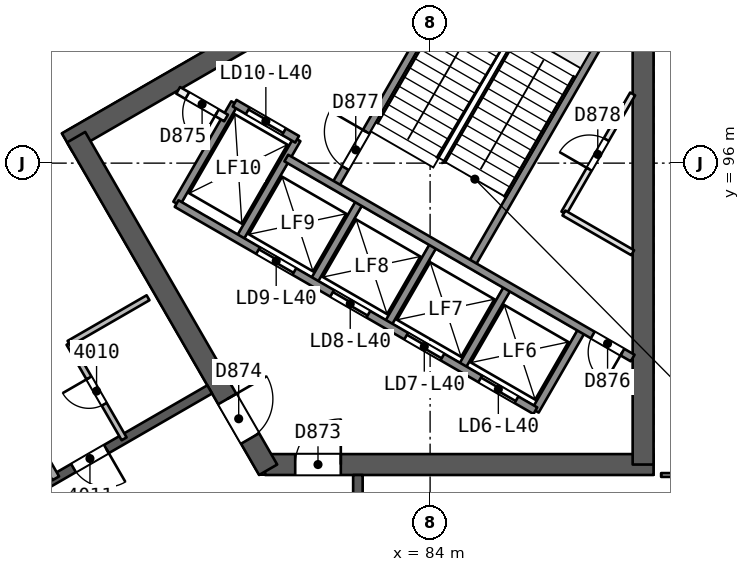
"""IFC4 building model, lengths in metres.
Left out: names, types, materials, properties, quantities, classifications, styles, units other than length and angle.
Written with IfcOpenShell. Run it as: python <this file> out.ifc"""

import sys

from ifc_helpers import new_model, si_unit, direction, frame, frame_2d, origin, place, context, subcontext, project, spatial, rectangle, extrude, element, fill, save


model = new_model("IFC4")
c1 = context("Model", 3, precision=1e-05, world=origin(), true_north=direction((0.0, 1.0)))
c2 = subcontext(c1, "Body", "Model", "MODEL_VIEW")
j1 = project(units=[si_unit("LENGTHUNIT", "METRE"), si_unit("PLANEANGLEUNIT", "RADIAN")], contexts=[c1])
p1 = place(None, origin())
s1 = spatial("IfcSite", under=j1, at=p1, CompositionType="ELEMENT")
p2 = place(p1, origin())
s2 = spatial("IfcBuilding", under=s1, at=p2, CompositionType="ELEMENT")
p3 = place(p2, frame((0.0, 0.0, 167.4)))
s3 = spatial("IfcBuildingStorey", under=s2, at=p3, CompositionType="ELEMENT", Elevation=167.4)
p4 = place(p3, frame((79.659, 88.069, 0.0), z_axis=(0.0, 0.0, 1.0), x_axis=(1.0, 0.0, 0.0)))
e1 = element("IfcWall", 1, at=p4, inside=s3, PredefinedType="SHEAR", context=c2, shape_type="SweptSolid", body=[
    extrude(rectangle(XDim=10.221, YDim=0.55, at=frame_2d((5.111, 0.0))), origin(), (0.0, 0.0, 1.0), 3.7),
])
p5 = place(p4, frame((0.791, 0.0, 0.0)))
e2 = element("IfcOpeningElement", 2, at=p5, cuts=e1, PredefinedType="OPENING", context=c2, shape_type="SweptSolid", body=[
    extrude(rectangle(XDim=1.2, YDim=2.1, at=frame_2d((0.6, 1.05))), frame((0.0, 0.286, 0.0), z_axis=(0.0, -1.0, 0.0), x_axis=(1.0, 0.0, 0.0)), (0.0, 0.0, 1.0), 0.571),
])
p6 = place(p3, frame((89.605, 88.069, 0.0), z_axis=(0.0, 0.0, 1.0), x_axis=(0.0, 1.0, 0.0)))
e3 = element("IfcWall", 3, at=p6, inside=s3, PredefinedType="SHEAR", context=c2, shape_type="SweptSolid", body=[
    extrude(rectangle(XDim=14.058, YDim=0.55, at=frame_2d((7.029, 0.0))), origin(), (0.0, 0.0, 1.0), 3.7),
])
p7 = place(p3, frame((86.723, 103.633, 0.0), z_axis=(0.0, 0.0, 1.0), x_axis=(-0.866023530946, -0.500003243837, 0.0)))
e4 = element("IfcWall", 4, at=p7, inside=s3, PredefinedType="SHEAR", context=c2, shape_type="SweptSolid", body=[
    extrude(rectangle(XDim=14.175, YDim=0.55, at=frame_2d((7.087, 0.0))), origin(), (0.0, 0.0, 1.0), 3.7),
])
p8 = place(p3, frame((74.686, 96.683, 0.0), z_axis=(0.0, 0.0, 1.0), x_axis=(0.499997818338, -0.866026663364, 0.0)))
e5 = element("IfcWall", 5, at=p8, inside=s3, PredefinedType="SHEAR", context=c2, shape_type="SweptSolid", body=[
    extrude(rectangle(XDim=10.105, YDim=0.55, at=frame_2d((5.052, 0.0))), origin(), (0.0, 0.0, 1.0), 3.7),
])
p9 = place(p8, frame((7.955, 0.0, 0.0)))
e6 = element("IfcOpeningElement", 6, at=p9, cuts=e5, PredefinedType="OPENING", context=c2, shape_type="SweptSolid", body=[
    extrude(rectangle(XDim=1.2, YDim=2.1, at=frame_2d((0.6, 1.05))), frame((0.0, 0.286, 0.0), z_axis=(0.0, -1.0, 0.0), x_axis=(1.0, 0.0, 0.0)), (0.0, 0.0, 1.0), 0.571),
])
p10 = place(p3, frame((82.1, 72.206, 0.0), z_axis=(0.0, 0.0, 1.0), x_axis=(0.0, 1.0, 0.0)))
e7 = element("IfcWall", 7, at=p10, inside=s3, PredefinedType="SHEAR", context=c2, shape_type="SweptSolid", body=[
    extrude(rectangle(XDim=15.588, YDim=0.25, at=frame_2d((7.794, 0.0))), origin(), (0.0, 0.0, 1.0), 3.25),
])
p11 = place(p10, frame((2.618, 0.0, 0.0)))
e8 = element("IfcOpeningElement", 8, at=p11, cuts=e7, PredefinedType="OPENING", context=c2, shape_type="SweptSolid", body=[
    extrude(rectangle(XDim=1.0, YDim=2.1, at=frame_2d((0.5, 1.05))), frame((0.0, 0.135, 0.0), z_axis=(0.0, -1.0, 0.0), x_axis=(1.0, 0.0, 0.0)), (0.0, 0.0, 1.0), 0.271),
])
p12 = place(p10, frame((8.285, 0.0, 0.0)))
e9 = element("IfcOpeningElement", 9, at=p12, cuts=e7, PredefinedType="OPENING", context=c2, shape_type="SweptSolid", body=[
    extrude(rectangle(XDim=1.2, YDim=2.4, at=frame_2d((0.6, 1.2))), frame((0.0, 0.135, 0.0), z_axis=(0.0, -1.0, 0.0), x_axis=(1.0, 0.0, 0.0)), (0.0, 0.0, 1.0), 0.271),
])
p13 = place(p10, frame((13.062, 0.0, 0.0)))
e10 = element("IfcOpeningElement", 10, at=p13, cuts=e7, PredefinedType="OPENING", context=c2, shape_type="SweptSolid", body=[
    extrude(rectangle(XDim=1.0, YDim=2.1, at=frame_2d((0.5, 1.05))), frame((0.0, 0.135, 0.0), z_axis=(0.0, -1.0, 0.0), x_axis=(1.0, 0.0, 0.0)), (0.0, 0.0, 1.0), 0.271),
])
p14 = place(p3, frame((78.2, 90.046, 0.0), z_axis=(0.0, 0.0, 1.0), x_axis=(-0.866026492143, -0.499998114903, 0.0)))
e11 = element("IfcWall", 11, at=p14, inside=s3, PredefinedType="SHEAR", context=c2, shape_type="SweptSolid", body=[
    extrude(rectangle(XDim=15.588, YDim=0.25, at=frame_2d((7.794, 0.0))), origin(), (0.0, 0.0, 1.0), 3.25),
])
p15 = place(p14, frame((3.138, 0.0, 0.0)))
e12 = element("IfcOpeningElement", 12, at=p15, cuts=e11, PredefinedType="OPENING", context=c2, shape_type="SweptSolid", body=[
    extrude(rectangle(XDim=1.0, YDim=2.1, at=frame_2d((0.5, 1.05))), frame((0.0, 0.135, 0.0), z_axis=(0.0, -1.0, 0.0), x_axis=(1.0, 0.0, 0.0)), (0.0, 0.0, 1.0), 0.271),
])
p16 = place(p14, frame((5.629, 0.0, 0.0)))
e13 = element("IfcOpeningElement", 13, at=p16, cuts=e11, PredefinedType="OPENING", context=c2, shape_type="SweptSolid", body=[
    extrude(rectangle(XDim=0.9, YDim=2.1, at=frame_2d((0.45, 1.05))), frame((0.0, 0.135, 0.0), z_axis=(0.0, -1.0, 0.0), x_axis=(1.0, 0.0, 0.0)), (0.0, 0.0, 1.0), 0.271),
])
p17 = place(p14, frame((8.435, 0.0, 0.0)))
e14 = element("IfcOpeningElement", 14, at=p17, cuts=e11, PredefinedType="OPENING", context=c2, shape_type="SweptSolid", body=[
    extrude(rectangle(XDim=0.9, YDim=2.1, at=frame_2d((0.45, 1.05))), frame((0.0, 0.135, 0.0), z_axis=(0.0, -1.0, 0.0), x_axis=(1.0, 0.0, 0.0)), (0.0, 0.0, 1.0), 0.271),
])
p18 = place(p14, frame((12.438, 0.0, 0.0)))
e15 = element("IfcOpeningElement", 15, at=p18, cuts=e11, PredefinedType="OPENING", context=c2, shape_type="SweptSolid", body=[
    extrude(rectangle(XDim=1.0, YDim=2.1, at=frame_2d((0.5, 1.05))), frame((0.0, 0.135, 0.0), z_axis=(0.0, -1.0, 0.0), x_axis=(1.0, 0.0, 0.0)), (0.0, 0.0, 1.0), 0.271),
])
p19 = place(p3, frame((93.577, 87.794, 0.0), z_axis=(0.0, 0.0, 1.0), x_axis=(-1.0, 0.0, 0.0)))
e16 = element("IfcWall", 16, at=p19, inside=s3, PredefinedType="PARTITIONING", context=c2, shape_type="SweptSolid", body=[
    extrude(rectangle(XDim=3.498, YDim=0.1, at=frame_2d((1.749, 0.0))), origin(), (0.0, 0.0, 1.0), 3.25),
])
p20 = place(p19, frame((1.299, 0.0, 0.0)))
e17 = element("IfcOpeningElement", 17, at=p20, cuts=e16, PredefinedType="OPENING", context=c2, shape_type="SweptSolid", body=[
    extrude(rectangle(XDim=0.9, YDim=2.1, at=frame_2d((0.45, 1.05))), frame((0.0, 0.061, 0.0), z_axis=(0.0, -1.0, 0.0), x_axis=(1.0, 0.0, 0.0)), (0.0, 0.0, 1.0), 0.121),
])
p21 = place(p3, frame((75.948, 88.746, 0.0), z_axis=(0.0, 0.0, 1.0), x_axis=(-0.499987231761, 0.866032775405, 0.0)))
e18 = element("IfcWall", 18, at=p21, inside=s3, PredefinedType="PARTITIONING", context=c2, shape_type="SweptSolid", body=[
    extrude(rectangle(XDim=2.9, YDim=0.15, at=frame_2d((1.45, 0.0))), origin(), (0.0, 0.0, 1.0), 3.25),
])
p22 = place(p21, frame((1.05, 0.0, 0.0)))
e19 = element("IfcOpeningElement", 19, at=p22, cuts=e18, PredefinedType="OPENING", context=c2, shape_type="SweptSolid", body=[
    extrude(rectangle(XDim=0.8, YDim=2.1, at=frame_2d((0.4, 1.05))), frame((0.0, 0.085, 0.0), z_axis=(0.0, -1.0, 0.0), x_axis=(1.0, 0.0, 0.0)), (0.0, 0.0, 1.0), 0.171),
])
p23 = place(p3, frame((74.498, 91.257, 0.0), z_axis=(0.0, 0.0, 1.0), x_axis=(0.866038271014, 0.499977712642, 0.0)))
e20 = element("IfcWall", 20, at=p23, inside=s3, PredefinedType="PARTITIONING", context=c2, shape_type="SweptSolid", body=[
    extrude(rectangle(XDim=2.401, YDim=0.15, at=frame_2d((1.2, 0.0))), origin(), (0.0, 0.0, 1.0), 3.25),
])
p24 = place(p3, frame((68.411, 97.647, 0.0), z_axis=(0.0, 0.0, 1.0), x_axis=(0.499998657322, -0.866026178979, 0.0)))
e21 = element("IfcWall", 21, at=p24, inside=s3, PredefinedType="PARTITIONING", context=c2, shape_type="SweptSolid", body=[
    extrude(rectangle(XDim=11.477, YDim=0.2, at=frame_2d((5.739, 0.0))), origin(), (0.0, 0.0, 1.0), 3.25),
])
p25 = place(p3, frame((42.319, 82.755, 0.0), z_axis=(0.0, 0.0, 1.0), x_axis=(0.866024017239, 0.50000240156, 0.0)))
e22 = element("IfcWall", 22, at=p25, inside=s3, PredefinedType="SOLIDWALL", context=c2, shape_type="SweptSolid", body=[
    extrude(rectangle(XDim=53.85, YDim=0.3, at=frame_2d((26.925, 0.0))), origin(), (0.0, 0.0, 1.0), 3.25),
])
p26 = place(p25, frame((20.581, 0.0, 0.0)))
e23 = element("IfcOpeningElement", 23, at=p26, cuts=e22, PredefinedType="OPENING", context=c2, shape_type="SweptSolid", body=[
    extrude(rectangle(XDim=2.4, YDim=2.4, at=frame_2d((1.2, 1.2))), frame((0.0, 0.161, 0.0), z_axis=(0.0, -1.0, 0.0), x_axis=(1.0, 0.0, 0.0)), (0.0, 0.0, 1.0), 0.321),
])
p27 = place(p25, frame((9.622, 0.0, 0.0)))
e24 = element("IfcOpeningElement", 24, at=p27, cuts=e22, PredefinedType="OPENING", context=c2, shape_type="SweptSolid", body=[
    extrude(rectangle(XDim=2.4, YDim=2.4, at=frame_2d((1.2, 1.2))), frame((0.0, 0.161, 0.0), z_axis=(0.0, -1.0, 0.0), x_axis=(1.0, 0.0, 0.0)), (0.0, 0.0, 1.0), 0.321),
])
p28 = place(p25, frame((40.79, 0.0, 0.0)))
e25 = element("IfcOpeningElement", 25, at=p28, cuts=e22, PredefinedType="OPENING", context=c2, shape_type="SweptSolid", body=[
    extrude(rectangle(XDim=2.4, YDim=2.4, at=frame_2d((1.2, 1.2))), frame((0.0, 0.161, 0.0), z_axis=(0.0, -1.0, 0.0), x_axis=(1.0, 0.0, 0.0)), (0.0, 0.0, 1.0), 0.321),
])
p29 = place(p25, frame((27.74, 0.0, 0.9)))
e26 = element("IfcOpeningElement", 26, at=p29, cuts=e22, PredefinedType="OPENING", context=c2, shape_type="SweptSolid", body=[
    extrude(rectangle(XDim=1.8, YDim=1.5, at=frame_2d((0.9, 0.75))), frame((0.0, 0.161, 0.0), z_axis=(0.0, -1.0, 0.0), x_axis=(1.0, 0.0, 0.0)), (0.0, 0.0, 1.0), 0.321),
])
p30 = place(p25, frame((24.934, 0.0, 0.9)))
e27 = element("IfcOpeningElement", 27, at=p30, cuts=e22, PredefinedType="OPENING", context=c2, shape_type="SweptSolid", body=[
    extrude(rectangle(XDim=1.8, YDim=1.5, at=frame_2d((0.9, 0.75))), frame((0.0, 0.161, 0.0), z_axis=(0.0, -1.0, 0.0), x_axis=(1.0, 0.0, 0.0)), (0.0, 0.0, 1.0), 0.321),
])
p31 = place(p3, frame((86.77, 89.486, 0.0), z_axis=(0.0, 0.0, 1.0), x_axis=(0.499961042966, 0.86604789447, 0.0)))
e28 = element("IfcWall", 28, at=p31, inside=s3, PredefinedType="SOLIDWALL", context=c2, shape_type="SweptSolid", body=[
    extrude(rectangle(XDim=2.48, YDim=0.2, at=frame_2d((1.24, 0.0))), origin(), (0.0, 0.0, 1.0), 3.25),
])
p32 = place(p3, frame((87.521, 94.687, 0.0), z_axis=(0.0, 0.0, 1.0), x_axis=(0.500043727655, 0.866000156139, 0.0)))
e29 = element("IfcWall", 29, at=p32, inside=s3, PredefinedType="PARTITIONING", context=c2, shape_type="SweptSolid", body=[
    extrude(rectangle(XDim=3.618, YDim=0.15, at=frame_2d((1.809, 0.0))), origin(), (0.0, 0.0, 1.0), 3.25),
])
p33 = place(p32, frame((1.332, 0.0, 0.0)))
e30 = element("IfcOpeningElement", 30, at=p33, cuts=e29, PredefinedType="OPENING", context=c2, shape_type="SweptSolid", body=[
    extrude(rectangle(XDim=0.9, YDim=2.1, at=frame_2d((0.45, 1.05))), frame((0.0, 0.085, 0.0), z_axis=(0.0, -1.0, 0.0), x_axis=(1.0, 0.0, 0.0)), (0.0, 0.0, 1.0), 0.171),
])
p34 = place(p3, frame((84.821, 90.611, 0.0), z_axis=(0.0, 0.0, 1.0), x_axis=(0.499961042966, 0.86604789447, 0.0)))
e31 = element("IfcWall", 31, at=p34, inside=s3, PredefinedType="SOLIDWALL", context=c2, shape_type="SweptSolid", body=[
    extrude(rectangle(XDim=2.48, YDim=0.2, at=frame_2d((1.24, 0.0))), origin(), (0.0, 0.0, 1.0), 3.25),
])
p35 = place(p3, frame((85.087, 93.321, 0.0), z_axis=(0.0, 0.0, 1.0), x_axis=(0.500019787375, 0.866013979237, 0.0)))
e32 = element("IfcWall", 32, at=p35, inside=s3, PredefinedType="SOLIDWALL", context=c2, shape_type="SweptSolid", body=[
    extrude(rectangle(XDim=7.7, YDim=0.2, at=frame_2d((3.85, 0.0))), origin(), (0.0, 0.0, 1.0), 3.25),
])
for number, where, z_axis, x_axis in (
    (33, (82.873, 91.736, 0.0), (0.0, 0.0, 1.0), (0.5, 0.866, 0.0)),
    (34, (80.924, 92.861, 0.0), (0.0, 0.0, 1.0), (0.5, 0.866, 0.0)),
):
    element("IfcWall", number, at=place(p3, frame(where, z_axis=z_axis, x_axis=x_axis)), inside=s3, PredefinedType="SOLIDWALL", context=c2, shape_type="SweptSolid", body=[
        extrude(rectangle(XDim=2.48, YDim=0.2, at=frame_2d((1.24, 0.0))), origin(), (0.0, 0.0, 1.0), 3.25),
    ])
p36 = place(p3, frame((81.493, 95.396, 0.0), z_axis=(0.0, 0.0, 1.0), x_axis=(0.500006057782, 0.866021906294, 0.0)))
e35 = element("IfcWall", 35, at=p36, inside=s3, PredefinedType="SOLIDWALL", context=c2, shape_type="SweptSolid", body=[
    extrude(rectangle(XDim=7.7, YDim=0.2, at=frame_2d((3.85, 0.0))), origin(), (0.0, 0.0, 1.0), 3.25),
])
p37 = place(p36, frame((0.55, 0.0, 0.0)))
e36 = element("IfcOpeningElement", 36, at=p37, cuts=e35, PredefinedType="OPENING", context=c2, shape_type="SweptSolid", body=[
    extrude(rectangle(XDim=1.1, YDim=2.1, at=frame_2d((0.55, 1.05))), frame((0.0, 0.11, 0.0), z_axis=(0.0, -1.0, 0.0), x_axis=(1.0, 0.0, 0.0)), (0.0, 0.0, 1.0), 0.221),
])
for number, where, z_axis, x_axis in (
    (37, (78.976, 93.986, 0.0), (0.0, 0.0, 1.0), (0.5, 0.866, 0.0)),
    (38, (77.33, 94.936, 0.0), (0.0, 0.0, 1.0), (0.5, 0.866, 0.0)),
):
    element("IfcWall", number, at=place(p3, frame(where, z_axis=z_axis, x_axis=x_axis)), inside=s3, PredefinedType="SOLIDWALL", context=c2, shape_type="SweptSolid", body=[
        extrude(rectangle(XDim=3.05, YDim=0.2, at=frame_2d((1.525, 0.0))), origin(), (0.0, 0.0, 1.0), 3.25),
    ])
p38 = place(p3, frame((86.77, 89.486, 0.0), z_axis=(0.0, 0.0, 1.0), x_axis=(-0.86601811187, 0.500012629753, 0.0)))
e39 = element("IfcWall", 39, at=p38, inside=s3, PredefinedType="SOLIDWALL", context=c2, shape_type="SweptSolid", body=[
    extrude(rectangle(XDim=10.9, YDim=0.2, at=frame_2d((5.45, 0.0))), origin(), (0.0, 0.0, 1.0), 3.25),
])
p39 = place(p38, frame((0.575, 0.0, 0.0)))
e40 = element("IfcOpeningElement", 40, at=p39, cuts=e39, PredefinedType="OPENING", context=c2, shape_type="SweptSolid", body=[
    extrude(rectangle(XDim=1.1, YDim=2.1, at=frame_2d((0.55, 1.05))), frame((0.0, 0.11, 0.0), z_axis=(0.0, -1.0, 0.0), x_axis=(1.0, 0.0, 0.0)), (0.0, 0.0, 1.0), 0.221),
])
p40 = place(p38, frame((2.825, 0.0, 0.0)))
e41 = element("IfcOpeningElement", 41, at=p40, cuts=e39, PredefinedType="OPENING", context=c2, shape_type="SweptSolid", body=[
    extrude(rectangle(XDim=1.1, YDim=2.1, at=frame_2d((0.55, 1.05))), frame((0.0, 0.11, 0.0), z_axis=(0.0, -1.0, 0.0), x_axis=(1.0, 0.0, 0.0)), (0.0, 0.0, 1.0), 0.221),
])
p41 = place(p38, frame((5.075, 0.0, 0.0)))
e42 = element("IfcOpeningElement", 42, at=p41, cuts=e39, PredefinedType="OPENING", context=c2, shape_type="SweptSolid", body=[
    extrude(rectangle(XDim=1.1, YDim=2.1, at=frame_2d((0.55, 1.05))), frame((0.0, 0.11, 0.0), z_axis=(0.0, -1.0, 0.0), x_axis=(1.0, 0.0, 0.0)), (0.0, 0.0, 1.0), 0.221),
])
p42 = place(p38, frame((7.325, 0.0, 0.0)))
e43 = element("IfcOpeningElement", 43, at=p42, cuts=e39, PredefinedType="OPENING", context=c2, shape_type="SweptSolid", body=[
    extrude(rectangle(XDim=1.1, YDim=2.1, at=frame_2d((0.55, 1.05))), frame((0.0, 0.11, 0.0), z_axis=(0.0, -1.0, 0.0), x_axis=(1.0, 0.0, 0.0)), (0.0, 0.0, 1.0), 0.221),
])
p43 = place(p3, frame((89.33, 90.872, 0.0), z_axis=(0.0, 0.0, 1.0), x_axis=(-0.866027589512, 0.49999621419, 0.0)))
e44 = element("IfcWall", 44, at=p43, inside=s3, PredefinedType="SOLIDWALL", context=c2, shape_type="SweptSolid", body=[
    extrude(rectangle(XDim=10.524, YDim=0.2, at=frame_2d((5.262, 0.0))), origin(), (0.0, 0.0, 1.0), 3.25),
])
p44 = place(p43, frame((0.312, 0.0, 0.0)))
e45 = element("IfcOpeningElement", 45, at=p44, cuts=e44, PredefinedType="OPENING", context=c2, shape_type="SweptSolid", body=[
    extrude(rectangle(XDim=0.9, YDim=2.1, at=frame_2d((0.45, 1.05))), frame((0.0, 0.11, 0.0), z_axis=(0.0, -1.0, 0.0), x_axis=(1.0, 0.0, 0.0)), (0.0, 0.0, 1.0), 0.221),
])
p45 = place(p3, frame((78.63, 97.188, 0.0), z_axis=(0.0, 0.0, 1.0), x_axis=(-0.866003949776, 0.500037157592, 0.0)))
e46 = element("IfcWall", 46, at=p45, inside=s3, PredefinedType="PARTITIONING", context=c2, shape_type="SweptSolid", body=[
    extrude(rectangle(XDim=1.455, YDim=0.2, at=frame_2d((0.728, 0.0))), origin(), (0.0, 0.0, 1.0), 3.25),
])
p46 = place(p45, frame((0.278, 0.0, 0.0)))
e47 = element("IfcOpeningElement", 47, at=p46, cuts=e46, PredefinedType="OPENING", context=c2, shape_type="SweptSolid", body=[
    extrude(rectangle(XDim=0.9, YDim=2.1, at=frame_2d((0.45, 1.05))), frame((0.0, 0.11, 0.0), z_axis=(0.0, -1.0, 0.0), x_axis=(1.0, 0.0, 0.0)), (0.0, 0.0, 1.0), 0.221),
])
p47 = place(p3, frame((80.5, 96.627, 0.0), z_axis=(0.0, 0.0, 1.0), x_axis=(-0.86601224135, 0.500022797313, 0.0)))
e48 = element("IfcWall", 48, at=p47, inside=s3, PredefinedType="SOLIDWALL", context=c2, shape_type="SweptSolid", body=[
    extrude(rectangle(XDim=1.9, YDim=0.2, at=frame_2d((0.95, 0.0))), origin(), (0.0, 0.0, 1.0), 3.25),
])
p48 = place(p47, frame((0.4, 0.0, 0.0)))
e49 = element("IfcOpeningElement", 49, at=p48, cuts=e48, PredefinedType="OPENING", context=c2, shape_type="SweptSolid", body=[
    extrude(rectangle(XDim=1.1, YDim=2.1, at=frame_2d((0.55, 1.05))), frame((0.0, 0.11, 0.0), z_axis=(0.0, -1.0, 0.0), x_axis=(1.0, 0.0, 0.0)), (0.0, 0.0, 1.0), 0.221),
])
p49 = place(p3, frame((89.33, 93.643, 0.0), z_axis=(0.0, 0.0, 1.0), x_axis=(-0.866033778982, 0.499985493453, 0.0)))
e50 = element("IfcWall", 50, at=p49, inside=s3, PredefinedType="PARTITIONING", context=c2, shape_type="SweptSolid", body=[
    extrude(rectangle(XDim=2.089, YDim=0.15, at=frame_2d((1.044, 0.0))), origin(), (0.0, 0.0, 1.0), 3.25),
])
p50 = place(p22, origin())
e51 = element("IfcDoor", 51, at=p50, inside=s3, OperationType="SINGLE_SWING_RIGHT", PredefinedType="NOTDEFINED", context=c2, shape_type="SweptSolid", body=[
    extrude(rectangle(XDim=0.8, YDim=2.1, at=frame_2d((0.4, 1.05))), frame((0.0, 0.025, 0.0), z_axis=(0.0, -1.0, 0.0), x_axis=(1.0, 0.0, 0.0)), (0.0, 0.0, 1.0), 0.05),
])
fill(e19, e51)
p51 = place(p15, origin())
e52 = element("IfcDoor", 52, at=p51, inside=s3, OperationType="SINGLE_SWING_LEFT", PredefinedType="NOTDEFINED", context=c2, shape_type="SweptSolid", body=[
    extrude(rectangle(XDim=1.0, YDim=2.1, at=frame_2d((0.5, 1.05))), frame((0.0, 0.025, 0.0), z_axis=(0.0, -1.0, 0.0), x_axis=(1.0, 0.0, 0.0)), (0.0, 0.0, 1.0), 0.05),
])
fill(e12, e52)
p52 = place(p5, origin())
e53 = element("IfcDoor", 53, at=p52, inside=s3, OperationType="SINGLE_SWING_RIGHT", PredefinedType="NOTDEFINED", context=c2, shape_type="SweptSolid", body=[
    extrude(rectangle(XDim=1.2, YDim=2.1, at=frame_2d((0.6, 1.05))), frame((0.0, 0.025, 0.0), z_axis=(0.0, -1.0, 0.0), x_axis=(1.0, 0.0, 0.0)), (0.0, 0.0, 1.0), 0.05),
])
fill(e2, e53)
p53 = place(p9, origin())
e54 = element("IfcDoor", 54, at=p53, inside=s3, OperationType="SINGLE_SWING_LEFT", PredefinedType="NOTDEFINED", context=c2, shape_type="SweptSolid", body=[
    extrude(rectangle(XDim=1.2, YDim=2.1, at=frame_2d((0.6, 1.05))), frame((0.0, 0.025, 0.0), z_axis=(0.0, -1.0, 0.0), x_axis=(1.0, 0.0, 0.0)), (0.0, 0.0, 1.0), 0.05),
])
fill(e6, e54)
p54 = place(p39, origin())
e55 = element("IfcDoor", 55, at=p54, inside=s3, OperationType="SLIDING_TO_RIGHT", PredefinedType="NOTDEFINED", context=c2, shape_type="SweptSolid", body=[
    extrude(rectangle(XDim=1.1, YDim=2.1, at=frame_2d((0.55, 1.05))), frame((0.0, 0.025, 0.0), z_axis=(0.0, -1.0, 0.0), x_axis=(1.0, 0.0, 0.0)), (0.0, 0.0, 1.0), 0.05),
])
fill(e40, e55)
p55 = place(p40, origin())
e56 = element("IfcDoor", 56, at=p55, inside=s3, OperationType="SLIDING_TO_LEFT", PredefinedType="NOTDEFINED", context=c2, shape_type="SweptSolid", body=[
    extrude(rectangle(XDim=1.1, YDim=2.1, at=frame_2d((0.55, 1.05))), frame((0.0, 0.025, 0.0), z_axis=(0.0, -1.0, 0.0), x_axis=(1.0, 0.0, 0.0)), (0.0, 0.0, 1.0), 0.05),
])
fill(e41, e56)
p56 = place(p41, origin())
e57 = element("IfcDoor", 57, at=p56, inside=s3, OperationType="SLIDING_TO_RIGHT", PredefinedType="NOTDEFINED", context=c2, shape_type="SweptSolid", body=[
    extrude(rectangle(XDim=1.1, YDim=2.1, at=frame_2d((0.55, 1.05))), frame((0.0, 0.025, 0.0), z_axis=(0.0, -1.0, 0.0), x_axis=(1.0, 0.0, 0.0)), (0.0, 0.0, 1.0), 0.05),
])
fill(e42, e57)
p57 = place(p42, origin())
e58 = element("IfcDoor", 58, at=p57, inside=s3, OperationType="SLIDING_TO_LEFT", PredefinedType="NOTDEFINED", context=c2, shape_type="SweptSolid", body=[
    extrude(rectangle(XDim=1.1, YDim=2.1, at=frame_2d((0.55, 1.05))), frame((0.0, 0.025, 0.0), z_axis=(0.0, -1.0, 0.0), x_axis=(1.0, 0.0, 0.0)), (0.0, 0.0, 1.0), 0.05),
])
fill(e43, e58)
p58 = place(p48, origin())
e59 = element("IfcDoor", 59, at=p58, inside=s3, OperationType="SLIDING_TO_RIGHT", PredefinedType="NOTDEFINED", context=c2, shape_type="SweptSolid", body=[
    extrude(rectangle(XDim=1.1, YDim=2.1, at=frame_2d((0.55, 1.05))), frame((0.0, 0.025, 0.0), z_axis=(0.0, -1.0, 0.0), x_axis=(1.0, 0.0, 0.0)), (0.0, 0.0, 1.0), 0.05),
])
fill(e49, e59)
p59 = place(p46, origin())
e60 = element("IfcDoor", 60, at=p59, inside=s3, OperationType="SINGLE_SWING_LEFT", PredefinedType="NOTDEFINED", context=c2, shape_type="SweptSolid", body=[
    extrude(rectangle(XDim=0.9, YDim=2.1, at=frame_2d((0.45, 1.05))), frame((0.0, 0.025, 0.0), z_axis=(0.0, -1.0, 0.0), x_axis=(1.0, 0.0, 0.0)), (0.0, 0.0, 1.0), 0.05),
])
fill(e47, e60)
p60 = place(p44, origin())
e61 = element("IfcDoor", 61, at=p60, inside=s3, OperationType="SINGLE_SWING_LEFT", PredefinedType="NOTDEFINED", context=c2, shape_type="SweptSolid", body=[
    extrude(rectangle(XDim=0.9, YDim=2.1, at=frame_2d((0.45, 1.05))), frame((0.0, 0.025, 0.0), z_axis=(0.0, -1.0, 0.0), x_axis=(1.0, 0.0, 0.0)), (0.0, 0.0, 1.0), 0.05),
])
fill(e45, e61)
p61 = place(p37, origin())
e62 = element("IfcDoor", 62, at=p61, inside=s3, OperationType="SINGLE_SWING_RIGHT", PredefinedType="NOTDEFINED", context=c2, shape_type="SweptSolid", body=[
    extrude(rectangle(XDim=1.1, YDim=2.1, at=frame_2d((0.55, 1.05))), frame((0.0, 0.025, 0.0), z_axis=(0.0, -1.0, 0.0), x_axis=(1.0, 0.0, 0.0)), (0.0, 0.0, 1.0), 0.05),
])
fill(e36, e62)
p62 = place(p33, origin())
e63 = element("IfcDoor", 63, at=p62, inside=s3, OperationType="SINGLE_SWING_LEFT", PredefinedType="NOTDEFINED", context=c2, shape_type="SweptSolid", body=[
    extrude(rectangle(XDim=0.9, YDim=2.1, at=frame_2d((0.45, 1.05))), frame((0.0, 0.025, 0.0), z_axis=(0.0, -1.0, 0.0), x_axis=(1.0, 0.0, 0.0)), (0.0, 0.0, 1.0), 0.05),
])
fill(e30, e63)
save(model, sys.argv[1])
